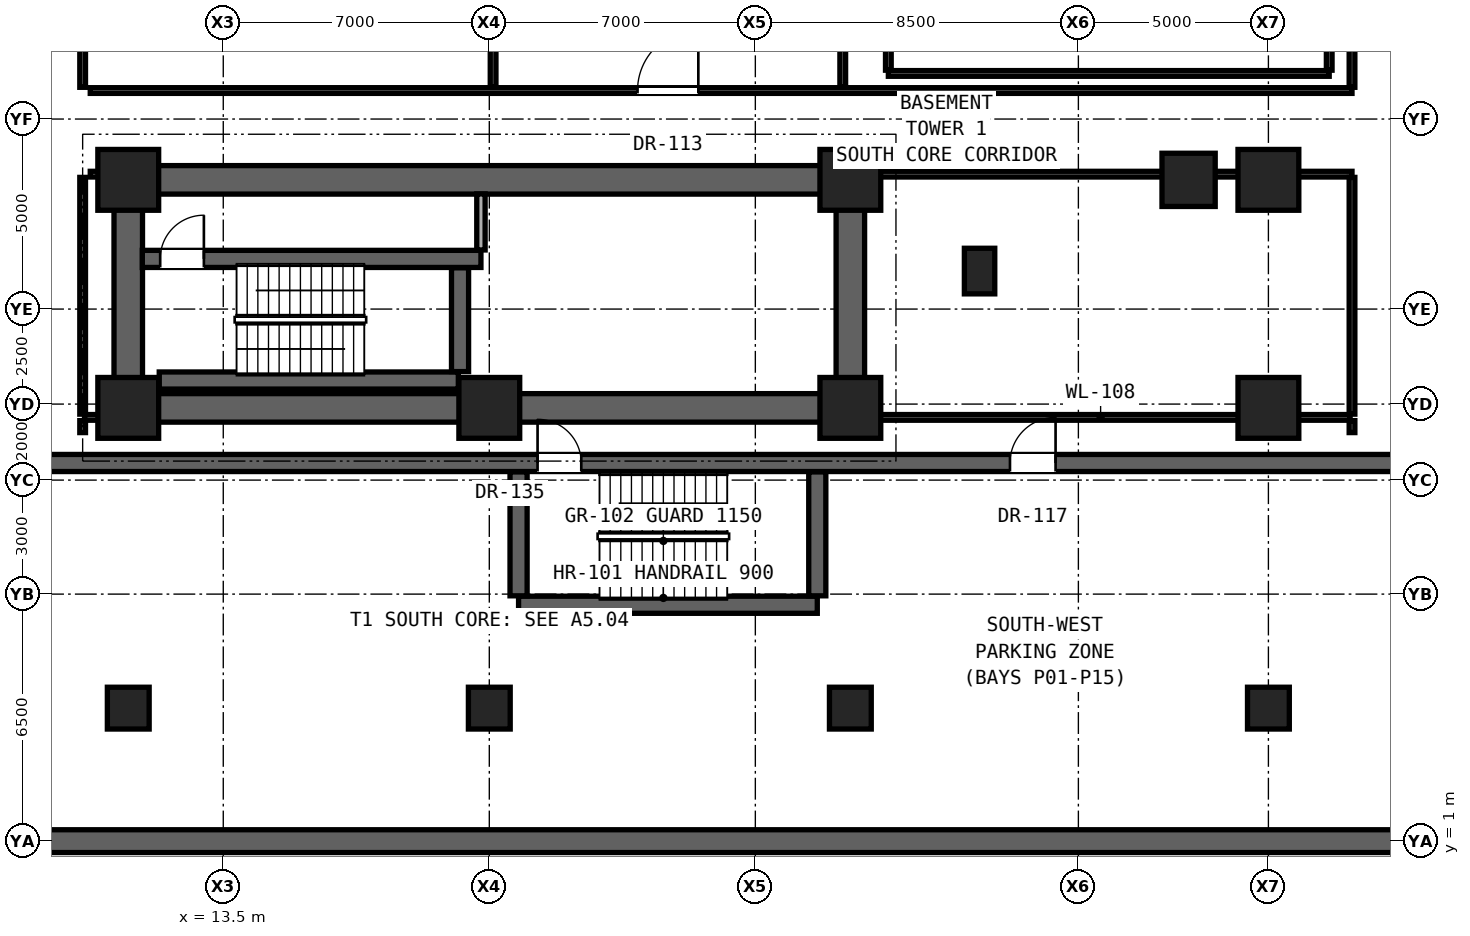
"""IFC4 building model, lengths in metres.
Left out: names, types, materials, properties, quantities, classifications, styles, units other than length and angle.
Written with IfcOpenShell. Run it as: python <this file> out.ifc"""

import sys

from ifc_helpers import new_model, si_unit, direction, frame, frame_2d, origin, origin_2d, place, context, subcontext, project, spatial, rectangle, hollow_rectangle, extrude, element, fill, save


model = new_model("IFC4")
c1 = context("Model", 3, precision=1e-05, world=origin(), true_north=direction((0.0, 1.0)))
c2 = subcontext(c1, "Body", "Model", "MODEL_VIEW")
j1 = project(units=[si_unit("LENGTHUNIT", "METRE"), si_unit("PLANEANGLEUNIT", "RADIAN")], contexts=[c1])
p1 = place(None, origin())
s1 = spatial("IfcSite", under=j1, at=p1, CompositionType="ELEMENT")
p2 = place(p1, origin())
s2 = spatial("IfcBuilding", under=s1, at=p2, CompositionType="ELEMENT")
p3 = place(p2, frame((0.0, 0.0, -4.8)))
s3 = spatial("IfcBuildingStorey", under=s2, at=p3, CompositionType="ELEMENT", Elevation=-4.8)
p4 = place(p3, frame((5.0, 1.0, 0.0), z_axis=(0.0, 0.0, 1.0), x_axis=(1.0, 0.0, 0.0)))
e1 = element("IfcWall", 1, at=p4, inside=s3, PredefinedType="USERDEFINED", context=c2, shape_type="SweptSolid", body=[
    extrude(rectangle(XDim=90.0, YDim=0.6, at=frame_2d((45.0, 0.0))), origin(), (0.0, 0.0, 1.0), 4.62),
])
for number, where, z_axis, x_axis in (
    (2, (11.0, 12.4, 0.0), (0.0, 0.0, 1.0), (1.0, 0.0, 0.0)),
    (3, (20.5, 12.4, 0.0), (0.0, 0.0, 1.0), (1.0, 0.0, 0.0)),
    (4, (30.0, 12.4, 0.0), (0.0, 0.0, 1.0), (1.0, 0.0, 0.0)),
    (5, (11.0, 18.4, 0.0), (0.0, 0.0, 1.0), (1.0, 0.0, 0.0)),
    (6, (30.0, 18.4, 0.0), (0.0, 0.0, 1.0), (1.0, 0.0, 0.0)),
):
    element("IfcColumn", number, at=place(p3, frame(where, z_axis=z_axis, x_axis=x_axis)), inside=s3, PredefinedType="COLUMN", context=c2, shape_type="SweptSolid", body=[
        extrude(rectangle(XDim=1.6, YDim=1.6, at=origin_2d()), origin(), (0.0, 0.0, 1.0), 4.8),
    ])
p5 = place(p3, frame((38.9, 18.4, 0.0), z_axis=(0.0, 0.0, 1.0), x_axis=(1.0, 0.0, 0.0)))
e7 = element("IfcColumn", 7, at=p5, inside=s3, PredefinedType="COLUMN", context=c2, shape_type="SweptSolid", body=[
    extrude(hollow_rectangle(XDim=1.4, YDim=1.4, WallThickness=0.08, at=origin_2d()), origin(), (0.0, 0.0, 1.0), 4.8),
])
p6 = place(p3, frame((33.4, 16.0, 0.0), z_axis=(0.0, 0.0, 1.0), x_axis=(1.0, 0.0, 0.0)))
e8 = element("IfcColumn", 8, at=p6, inside=s3, PredefinedType="PILASTER", context=c2, shape_type="SweptSolid", body=[
    extrude(rectangle(XDim=0.8, YDim=1.2, at=origin_2d()), origin(), (0.0, 0.0, 1.0), 4.8),
])
p7 = place(p3, frame((11.0, 12.4, 0.0), z_axis=(0.0, 0.0, 1.0), x_axis=(1.0, 0.0, 0.0)))
e9 = element("IfcWall", 9, at=p7, inside=s3, PredefinedType="SHEAR", context=c2, shape_type="SweptSolid", body=[
    extrude(rectangle(XDim=19.0, YDim=0.75, at=frame_2d((9.5, 0.0))), origin(), (0.0, 0.0, 1.0), 4.48),
])
for number, where, z_axis, x_axis in (
    (10, (11.0, 12.4, 0.0), (0.0, 0.0, 1.0), (0.0, 1.0, 0.0)),
    (11, (30.0, 12.4, 0.0), (0.0, 0.0, 1.0), (0.0, 1.0, 0.0)),
):
    element("IfcWall", number, at=place(p3, frame(where, z_axis=z_axis, x_axis=x_axis)), inside=s3, PredefinedType="SHEAR", context=c2, shape_type="SweptSolid", body=[
        extrude(rectangle(XDim=6.0, YDim=0.75, at=frame_2d((3.0, 0.0))), origin(), (0.0, 0.0, 1.0), 4.48),
    ])
p8 = place(p3, frame((11.0, 18.4, 0.0), z_axis=(0.0, 0.0, 1.0), x_axis=(1.0, 0.0, 0.0)))
e12 = element("IfcWall", 12, at=p8, inside=s3, PredefinedType="SHEAR", context=c2, shape_type="SweptSolid", body=[
    extrude(rectangle(XDim=19.0, YDim=0.75, at=frame_2d((9.5, 0.0))), origin(), (0.0, 0.0, 1.0), 4.48),
])
for number, where, z_axis, x_axis in (
    (13, (41.0, 12.4, 0.0), (0.0, 0.0, 1.0), (1.0, 0.0, 0.0)),
    (14, (41.0, 18.4, 0.0), (0.0, 0.0, 1.0), (1.0, 0.0, 0.0)),
):
    element("IfcColumn", number, at=place(p3, frame(where, z_axis=z_axis, x_axis=x_axis)), inside=s3, PredefinedType="COLUMN", context=c2, shape_type="SweptSolid", body=[
        extrude(rectangle(XDim=1.6, YDim=1.6, at=origin_2d()), origin(), (0.0, 0.0, 1.0), 4.8),
    ])
for number, where, z_axis, x_axis in (
    (15, (11.0, 4.5, 0.0), (0.0, 0.0, 1.0), (1.0, 0.0, 0.0)),
    (16, (20.5, 4.5, 0.0), (0.0, 0.0, 1.0), (1.0, 0.0, 0.0)),
    (17, (30.0, 4.5, 0.0), (0.0, 0.0, 1.0), (1.0, 0.0, 0.0)),
    (18, (41.0, 4.5, 0.0), (0.0, 0.0, 1.0), (1.0, 0.0, 0.0)),
):
    element("IfcColumn", number, at=place(p3, frame(where, z_axis=z_axis, x_axis=x_axis)), inside=s3, PredefinedType="COLUMN", context=c2, shape_type="SweptSolid", body=[
        extrude(rectangle(XDim=1.1, YDim=1.1, at=origin_2d()), origin(), (0.0, 0.0, 1.0), 4.8),
    ])
p9 = place(p3, frame((21.27, 7.22, 0.0), z_axis=(0.0, 0.0, 1.0), x_axis=(1.0, 0.0, 0.0)))
e19 = element("IfcWall", 19, at=p9, inside=s3, PredefinedType="SHEAR", context=c2, shape_type="SweptSolid", body=[
    extrude(rectangle(XDim=7.86, YDim=0.45, at=frame_2d((3.93, 0.0))), origin(), (0.0, 0.0, 1.0), 4.48),
])
p10 = place(p3, frame((3.2, 10.95, 0.0), z_axis=(0.0, 0.0, 1.0), x_axis=(1.0, 0.0, 0.0)))
e20 = element("IfcWall", 20, at=p10, inside=s3, PredefinedType="SHEAR", context=c2, shape_type="SweptSolid", body=[
    extrude(rectangle(XDim=90.8, YDim=0.45, at=frame_2d((45.4, 0.0))), origin(), (0.0, 0.0, 1.0), 4.48),
])
p11 = place(p10, frame((18.57, 0.0, 0.0)))
e21 = element("IfcOpeningElement", 21, at=p11, cuts=e20, PredefinedType="OPENING", context=c2, shape_type="SweptSolid", body=[
    extrude(rectangle(XDim=1.15, YDim=2.2, at=frame_2d((0.575, 1.1))), frame((0.0, 0.235, 0.0), z_axis=(0.0, -1.0, 0.0), x_axis=(1.0, 0.0, 0.0)), (0.0, 0.0, 1.0), 0.47),
])
p12 = place(p10, frame((66.17, 0.0, 0.0)))
e22 = element("IfcOpeningElement", 22, at=p12, cuts=e20, PredefinedType="OPENING", context=c2, shape_type="SweptSolid", body=[
    extrude(rectangle(XDim=1.15, YDim=2.2, at=frame_2d((0.575, 1.1))), frame((0.0, 0.235, 0.0), z_axis=(0.0, -1.0, 0.0), x_axis=(1.0, 0.0, 0.0)), (0.0, 0.0, 1.0), 0.47),
])
p13 = place(p10, frame((31.0, 0.0, 0.0)))
e23 = element("IfcOpeningElement", 23, at=p13, cuts=e20, PredefinedType="OPENING", context=c2, shape_type="SweptSolid", body=[
    extrude(rectangle(XDim=1.2, YDim=2.25, at=frame_2d((0.6, 1.125))), frame((0.0, 0.235, 0.0), z_axis=(0.0, -1.0, 0.0), x_axis=(1.0, 0.0, 0.0)), (0.0, 0.0, 1.0), 0.47),
])
p14 = place(p10, frame((52.45, 0.0, 0.0)))
e24 = element("IfcOpeningElement", 24, at=p14, cuts=e20, PredefinedType="OPENING", context=c2, shape_type="SweptSolid", body=[
    extrude(rectangle(XDim=1.2, YDim=2.25, at=frame_2d((0.6, 1.125))), frame((0.0, 0.235, 0.0), z_axis=(0.0, -1.0, 0.0), x_axis=(1.0, 0.0, 0.0)), (0.0, 0.0, 1.0), 0.47),
])
p15 = place(p3, frame((9.85, 12.15, 0.0), z_axis=(0.0, 0.0, 1.0), x_axis=(1.0, 0.0, 0.0)))
e25 = element("IfcWall", 25, at=p15, inside=s3, PredefinedType="PARTITIONING", context=c2, shape_type="SweptSolid", body=[
    extrude(rectangle(XDim=1.13, YDim=0.15, at=frame_2d((0.565, 0.0))), origin(), (0.0, 0.0, 1.0), 3.519),
])
p16 = place(p3, frame((30.02, 12.15, 0.0), z_axis=(0.0, 0.0, 1.0), x_axis=(1.0, 0.0, 0.0)))
e26 = element("IfcWall", 26, at=p16, inside=s3, PredefinedType="PARTITIONING", context=c2, shape_type="SweptSolid", body=[
    extrude(rectangle(XDim=13.13, YDim=0.15, at=frame_2d((6.565, 0.0))), origin(), (0.0, 0.0, 1.0), 3.252),
])
p17 = place(p3, frame((11.815, 13.12, 0.0), z_axis=(0.0, 0.0, 1.0), x_axis=(1.0, 0.0, 0.0)))
e27 = element("IfcWall", 27, at=p17, inside=s3, PredefinedType="SHEAR", context=c2, shape_type="SweptSolid", body=[
    extrude(rectangle(XDim=7.87, YDim=0.45, at=frame_2d((3.935, 0.0))), origin(), (0.0, 0.0, 1.0), 4.48),
])
p18 = place(p3, frame((11.37, 16.32, 0.0), z_axis=(0.0, 0.0, 1.0), x_axis=(1.0, 0.0, 0.0)))
e28 = element("IfcWall", 28, at=p18, inside=s3, PredefinedType="SHEAR", context=c2, shape_type="SweptSolid", body=[
    extrude(rectangle(XDim=8.91, YDim=0.45, at=frame_2d((4.455, 0.0))), origin(), (0.0, 0.0, 1.0), 4.48),
])
p19 = place(p18, frame((0.47, 0.0, 0.0)))
e29 = element("IfcOpeningElement", 29, at=p19, cuts=e28, PredefinedType="OPENING", context=c2, shape_type="SweptSolid", body=[
    extrude(rectangle(XDim=1.15, YDim=2.2, at=frame_2d((0.575, 1.1))), frame((0.0, 0.235, 0.0), z_axis=(0.0, -1.0, 0.0), x_axis=(1.0, 0.0, 0.0)), (0.0, 0.0, 1.0), 0.47),
])
p20 = place(p3, frame((10.0, 18.55, 0.0), z_axis=(0.0, 0.0, 1.0), x_axis=(1.0, 0.0, 0.0)))
e30 = element("IfcWall", 30, at=p20, inside=s3, PredefinedType="PARTITIONING", context=c2, shape_type="SweptSolid", body=[
    extrude(rectangle(XDim=0.98, YDim=0.15, at=frame_2d((0.49, 0.0))), origin(), (0.0, 0.0, 1.0), 3.372),
])
p21 = place(p3, frame((30.02, 18.55, 0.0), z_axis=(0.0, 0.0, 1.0), x_axis=(1.0, 0.0, 0.0)))
e31 = element("IfcWall", 31, at=p21, inside=s3, PredefinedType="PARTITIONING", context=c2, shape_type="SweptSolid", body=[
    extrude(rectangle(XDim=13.18, YDim=0.15, at=frame_2d((6.59, 0.0))), origin(), (0.0, 0.0, 1.0), 3.252),
])
p22 = place(p3, frame((10.0, 20.75, 0.0), z_axis=(0.0, 0.0, 1.0), x_axis=(1.0, 0.0, 0.0)))
e32 = element("IfcWall", 32, at=p22, inside=s3, PredefinedType="PARTITIONING", context=c2, shape_type="SweptSolid", body=[
    extrude(rectangle(XDim=33.2, YDim=0.15, at=frame_2d((16.6, 0.0))), origin(), (0.0, 0.0, 1.0), 3.252),
])
p23 = place(p22, frame((14.4, 0.0, 0.0)))
e33 = element("IfcOpeningElement", 33, at=p23, cuts=e32, PredefinedType="OPENING", context=c2, shape_type="SweptSolid", body=[
    extrude(rectangle(XDim=1.6, YDim=2.3, at=frame_2d((0.8, 1.15))), frame((0.0, 0.085, 0.0), z_axis=(0.0, -1.0, 0.0), x_axis=(1.0, 0.0, 0.0)), (0.0, 0.0, 1.0), 0.17),
])
p24 = place(p3, frame((31.0, 21.2, 0.0), z_axis=(0.0, 0.0, 1.0), x_axis=(1.0, 0.0, 0.0)))
e34 = element("IfcWall", 34, at=p24, inside=s3, PredefinedType="PARTITIONING", context=c2, shape_type="SweptSolid", body=[
    extrude(rectangle(XDim=11.6, YDim=0.15, at=frame_2d((5.8, 0.0))), origin(), (0.0, 0.0, 1.0), 3.252),
])
p25 = place(p3, frame((9.8, 11.75, 0.0), z_axis=(0.0, 0.0, 1.0), x_axis=(0.0, 1.0, 0.0)))
e35 = element("IfcWall", 35, at=p25, inside=s3, PredefinedType="PARTITIONING", context=c2, shape_type="SweptSolid", body=[
    extrude(rectangle(XDim=0.315, YDim=0.15, at=frame_2d((0.157, 0.0))), origin(), (0.0, 0.0, 1.0), 4.3),
])
p26 = place(p3, frame((9.8, 12.235, 0.0), z_axis=(0.0, 0.0, 1.0), x_axis=(0.0, 1.0, 0.0)))
e36 = element("IfcWall", 36, at=p26, inside=s3, PredefinedType="PARTITIONING", context=c2, shape_type="SweptSolid", body=[
    extrude(rectangle(XDim=6.23, YDim=0.15, at=frame_2d((3.115, 0.0))), origin(), (0.0, 0.0, 1.0), 3.372),
])
p27 = place(p3, frame((9.8, 20.835, 0.0), z_axis=(0.0, 0.0, 1.0), x_axis=(0.0, 1.0, 0.0)))
e37 = element("IfcWall", 37, at=p27, inside=s3, PredefinedType="PARTITIONING", context=c2, shape_type="SweptSolid", body=[
    extrude(rectangle(XDim=11.88, YDim=0.15, at=frame_2d((5.94, 0.0))), origin(), (0.0, 0.0, 1.0), 3.699),
])
p28 = place(p3, frame((19.73, 13.355, 0.0), z_axis=(0.0, 0.0, 1.0), x_axis=(0.0, 1.0, 0.0)))
e38 = element("IfcWall", 38, at=p28, inside=s3, PredefinedType="SHEAR", context=c2, shape_type="SweptSolid", body=[
    extrude(rectangle(XDim=2.73, YDim=0.45, at=frame_2d((1.365, 0.0))), origin(), (0.0, 0.0, 1.0), 4.48),
])
p29 = place(p3, frame((20.28, 16.555, 0.0), z_axis=(0.0, 0.0, 1.0), x_axis=(0.0, 1.0, 0.0)))
e39 = element("IfcWall", 39, at=p29, inside=s3, PredefinedType="SOLIDWALL", context=c2, shape_type="SweptSolid", body=[
    extrude(rectangle(XDim=1.475, YDim=0.22, at=frame_2d((0.738, 0.0))), origin(), (0.0, 0.0, 1.0), 4.3),
])
p30 = place(p3, frame((20.6, 20.85, 0.0), z_axis=(0.0, 0.0, 1.0), x_axis=(0.0, 1.0, 0.0)))
e40 = element("IfcWall", 40, at=p30, inside=s3, PredefinedType="PARTITIONING", context=c2, shape_type="SweptSolid", body=[
    extrude(rectangle(XDim=7.565, YDim=0.15, at=frame_2d((3.782, 0.0))), origin(), (0.0, 0.0, 1.0), 3.432),
])
for number, where, z_axis, x_axis in (
    (41, (21.27, 7.455, 0.0), (0.0, 0.0, 1.0), (0.0, 1.0, 0.0)),
    (42, (29.13, 7.455, 0.0), (0.0, 0.0, 1.0), (0.0, 1.0, 0.0)),
):
    element("IfcWall", number, at=place(p3, frame(where, z_axis=z_axis, x_axis=x_axis)), inside=s3, PredefinedType="SHEAR", context=c2, shape_type="SweptSolid", body=[
        extrude(rectangle(XDim=3.26, YDim=0.45, at=frame_2d((1.63, 0.0))), origin(), (0.0, 0.0, 1.0), 4.48),
    ])
p31 = place(p3, frame((29.8, 20.85, 0.0), z_axis=(0.0, 0.0, 1.0), x_axis=(0.0, 1.0, 0.0)))
e43 = element("IfcWall", 43, at=p31, inside=s3, PredefinedType="PARTITIONING", context=c2, shape_type="SweptSolid", body=[
    extrude(rectangle(XDim=7.565, YDim=0.15, at=frame_2d((3.782, 0.0))), origin(), (0.0, 0.0, 1.0), 3.432),
])
p32 = place(p3, frame((31.0, 21.285, 0.0), z_axis=(0.0, 0.0, 1.0), x_axis=(0.0, 1.0, 0.0)))
e44 = element("IfcWall", 44, at=p32, inside=s3, PredefinedType="PARTITIONING", context=c2, shape_type="SweptSolid", body=[
    extrude(rectangle(XDim=7.13, YDim=0.15, at=frame_2d((3.565, 0.0))), origin(), (0.0, 0.0, 1.0), 3.699),
])
p33 = place(p3, frame((42.6, 21.285, 0.0), z_axis=(0.0, 0.0, 1.0), x_axis=(0.0, 1.0, 0.0)))
e45 = element("IfcWall", 45, at=p33, inside=s3, PredefinedType="PARTITIONING", context=c2, shape_type="SweptSolid", body=[
    extrude(rectangle(XDim=7.13, YDim=0.15, at=frame_2d((3.565, 0.0))), origin(), (0.0, 0.0, 1.0), 4.3),
])
p34 = place(p33, frame((2.765, 0.0, 0.0)))
e46 = element("IfcOpeningElement", 46, at=p34, cuts=e45, PredefinedType="OPENING", context=c2, shape_type="SweptSolid", body=[
    extrude(rectangle(XDim=1.6, YDim=2.3, at=frame_2d((0.8, 1.15))), frame((0.0, 0.085, 0.0), z_axis=(0.0, -1.0, 0.0), x_axis=(1.0, 0.0, 0.0)), (0.0, 0.0, 1.0), 0.17),
])
p35 = place(p3, frame((43.2, 11.75, 0.0), z_axis=(0.0, 0.0, 1.0), x_axis=(0.0, 1.0, 0.0)))
e47 = element("IfcWall", 47, at=p35, inside=s3, PredefinedType="PARTITIONING", context=c2, shape_type="SweptSolid", body=[
    extrude(rectangle(XDim=0.315, YDim=0.15, at=frame_2d((0.157, 0.0))), origin(), (0.0, 0.0, 1.0), 4.3),
])
p36 = place(p3, frame((43.2, 12.235, 0.0), z_axis=(0.0, 0.0, 1.0), x_axis=(0.0, 1.0, 0.0)))
e48 = element("IfcWall", 48, at=p36, inside=s3, PredefinedType="PARTITIONING", context=c2, shape_type="SweptSolid", body=[
    extrude(rectangle(XDim=6.23, YDim=0.15, at=frame_2d((3.115, 0.0))), origin(), (0.0, 0.0, 1.0), 3.252),
])
p37 = place(p3, frame((43.2, 20.835, 0.0), z_axis=(0.0, 0.0, 1.0), x_axis=(0.0, 1.0, 0.0)))
e49 = element("IfcWall", 49, at=p37, inside=s3, PredefinedType="PARTITIONING", context=c2, shape_type="SweptSolid", body=[
    extrude(rectangle(XDim=7.98, YDim=0.15, at=frame_2d((3.99, 0.0))), origin(), (0.0, 0.0, 1.0), 4.3),
])
p38 = place(p19, origin())
e50 = element("IfcDoor", 50, at=p38, inside=s3, OperationType="SINGLE_SWING_RIGHT", PredefinedType="DOOR", context=c2, shape_type="SweptSolid", body=[
    extrude(rectangle(XDim=1.15, YDim=2.2, at=frame_2d((0.575, 1.1))), frame((0.0, 0.025, 0.0), z_axis=(0.0, -1.0, 0.0), x_axis=(1.0, 0.0, 0.0)), (0.0, 0.0, 1.0), 0.05),
])
fill(e29, e50)
p39 = place(p11, origin())
e51 = element("IfcDoor", 51, at=p39, inside=s3, OperationType="SINGLE_SWING_LEFT", PredefinedType="DOOR", context=c2, shape_type="SweptSolid", body=[
    extrude(rectangle(XDim=1.15, YDim=2.2, at=frame_2d((0.575, 1.1))), frame((0.0, 0.025, 0.0), z_axis=(0.0, -1.0, 0.0), x_axis=(1.0, 0.0, 0.0)), (0.0, 0.0, 1.0), 0.05),
])
fill(e21, e51)
p40 = place(p23, origin())
e52 = element("IfcDoor", 52, at=p40, inside=s3, OperationType="SINGLE_SWING_RIGHT", PredefinedType="DOOR", context=c2, shape_type="SweptSolid", body=[
    extrude(rectangle(XDim=1.6, YDim=2.3, at=frame_2d((0.8, 1.15))), frame((0.0, 0.025, 0.0), z_axis=(0.0, -1.0, 0.0), x_axis=(1.0, 0.0, 0.0)), (0.0, 0.0, 1.0), 0.05),
])
fill(e33, e52)
p41 = place(p13, origin())
e53 = element("IfcDoor", 53, at=p41, inside=s3, OperationType="SINGLE_SWING_RIGHT", PredefinedType="DOOR", context=c2, shape_type="SweptSolid", body=[
    extrude(rectangle(XDim=1.2, YDim=2.25, at=frame_2d((0.6, 1.125))), frame((0.0, 0.025, 0.0), z_axis=(0.0, -1.0, 0.0), x_axis=(1.0, 0.0, 0.0)), (0.0, 0.0, 1.0), 0.05),
])
fill(e23, e53)
save(model, sys.argv[1])
